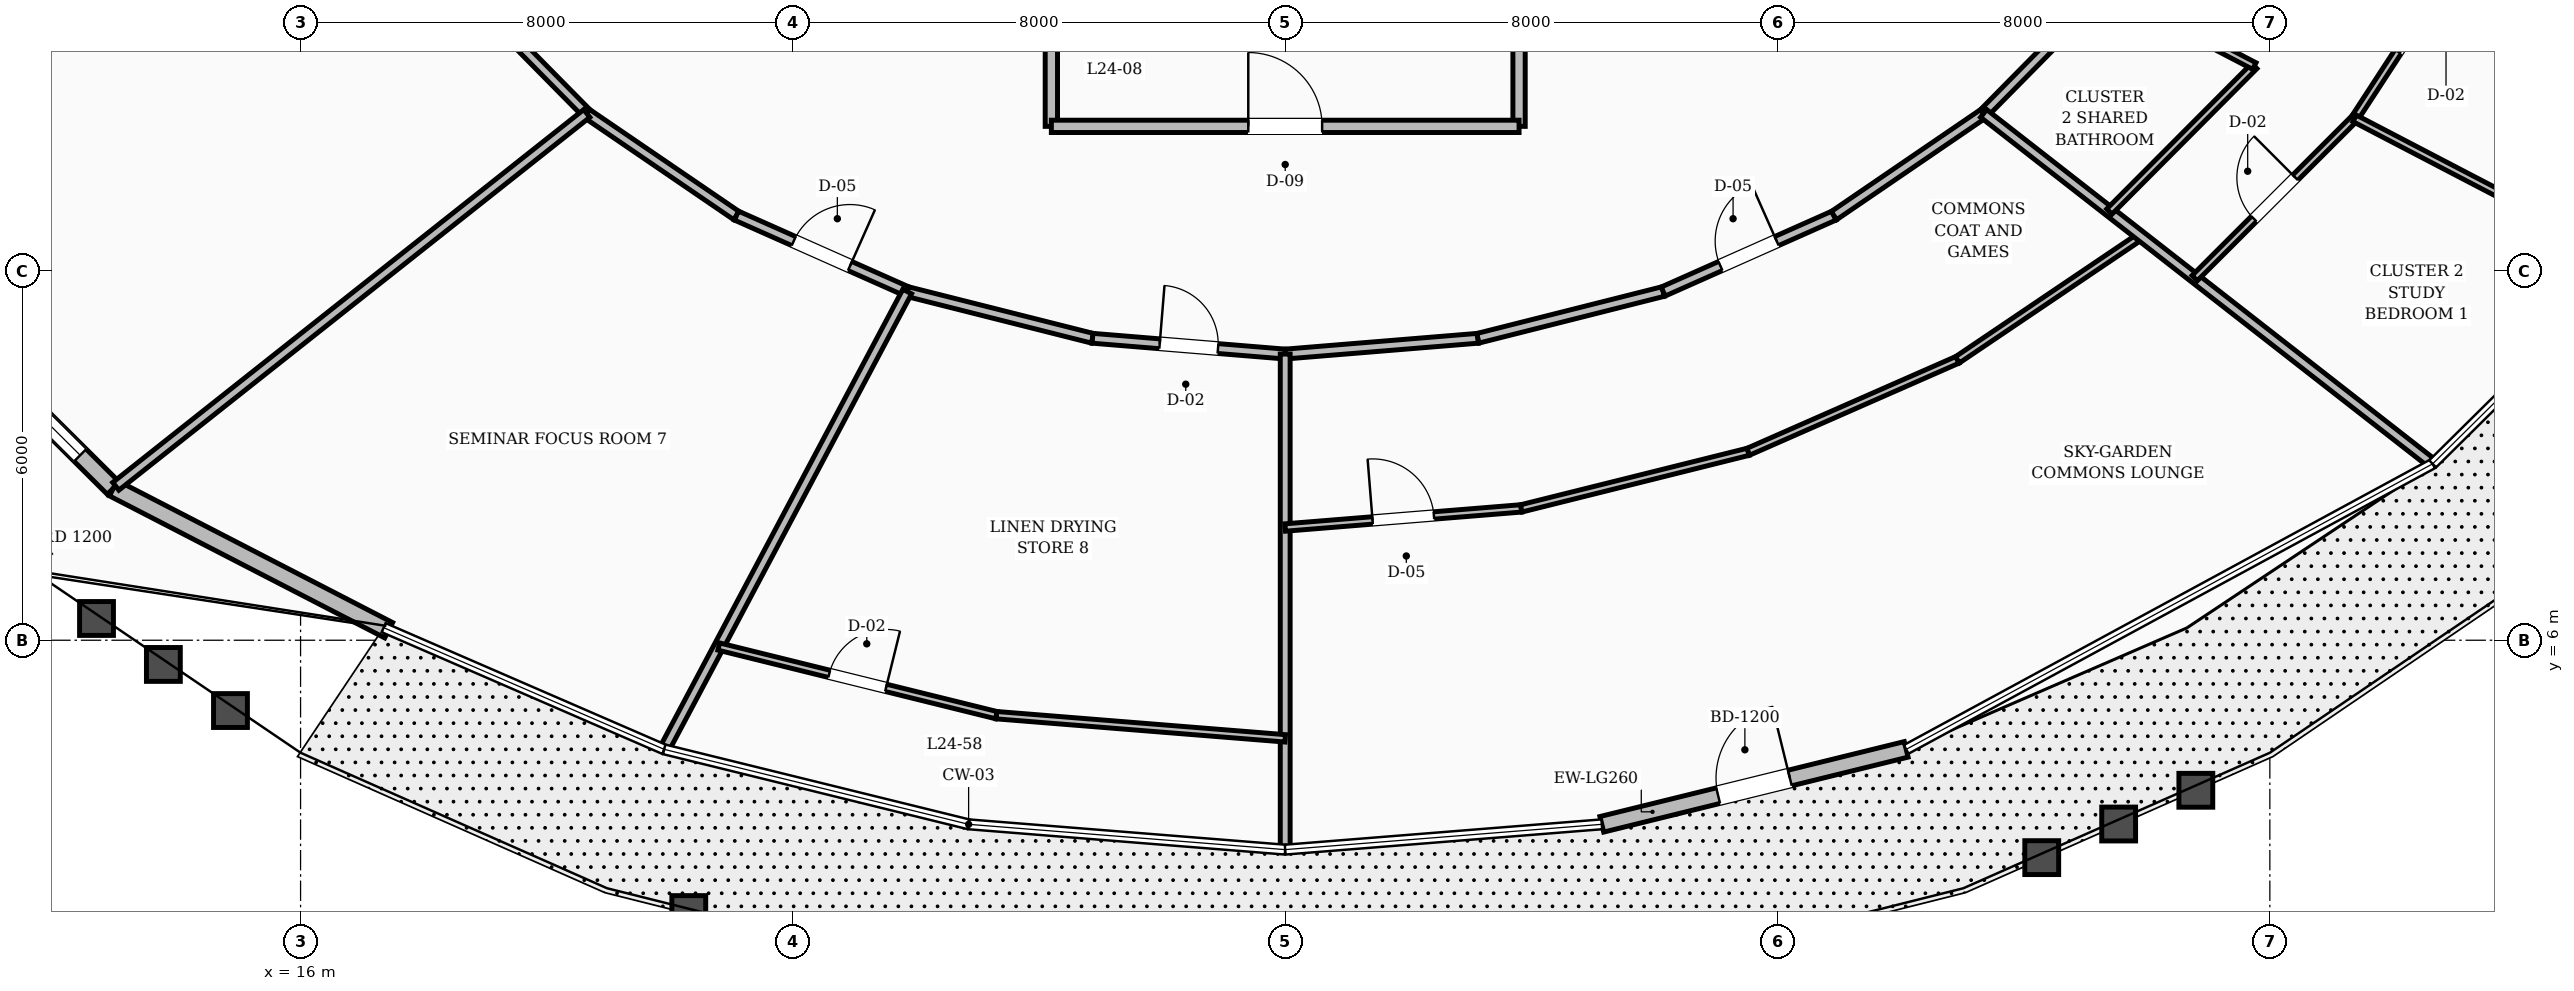
"""IFC4 building model, lengths in metres.
Left out: names, types, materials, properties, quantities, classifications, styles, units other than length and angle.
Written with IfcOpenShell. Run it as: python <this file> out.ifc"""

import sys

from ifc_helpers import new_model, si_unit, direction, frame, frame_2d, origin, place, context, subcontext, project, spatial, rectangle, extrude, element, fill, save


model = new_model("IFC4")
c1 = context("Model", 3, precision=1e-05, world=origin(), true_north=direction((0.0, 1.0)))
c2 = subcontext(c1, "Body", "Model", "MODEL_VIEW")
j1 = project(units=[si_unit("LENGTHUNIT", "METRE"), si_unit("PLANEANGLEUNIT", "RADIAN")], contexts=[c1])
p1 = place(None, origin())
s1 = spatial("IfcSite", under=j1, at=p1, CompositionType="ELEMENT")
p2 = place(p1, origin())
s2 = spatial("IfcBuilding", under=s1, at=p2, CompositionType="ELEMENT")
p3 = place(p2, frame((0.0, 0.0, 95.2)))
s3 = spatial("IfcBuildingStorey", under=s2, at=p3, CompositionType="ELEMENT", Elevation=95.2)
p4 = place(p3, frame((9.609, 11.798, 0.0), z_axis=(0.0, 0.0, 1.0), x_axis=(0.70930102543, -0.70490570669, 0.0)))
e1 = element("IfcWall", 1, at=p4, inside=s3, PredefinedType="STANDARD", context=c2, shape_type="SweptSolid", body=[
    extrude(rectangle(XDim=4.721, YDim=0.28, at=frame_2d((2.361, 0.0))), origin(), (0.0, 0.0, 1.0), 2.71),
])
p5 = place(p4, frame((0.761, 0.0, 0.8)))
e2 = element("IfcOpeningElement", 2, at=p5, cuts=e1, PredefinedType="OPENING", context=c2, shape_type="SweptSolid", body=[
    extrude(rectangle(XDim=3.2, YDim=1.65, at=frame_2d((1.6, 0.825))), frame((0.0, 0.15, 0.0), z_axis=(0.0, -1.0, 0.0), x_axis=(1.0, 0.0, 0.0)), (0.0, 0.0, 1.0), 0.3),
])
p6 = place(p3, frame((12.958, 8.47, 0.0), z_axis=(0.0, 0.0, 1.0), x_axis=(0.888710545959, -0.458468718127, 0.0)))
e3 = element("IfcWall", 3, at=p6, inside=s3, PredefinedType="STANDARD", context=c2, shape_type="SweptSolid", body=[
    extrude(rectangle(XDim=5.034, YDim=0.28, at=frame_2d((2.517, 0.0))), origin(), (0.0, 0.0, 1.0), 2.71),
])
p7 = place(p3, frame((37.144, 3.009, 0.0), z_axis=(0.0, 0.0, 1.0), x_axis=(0.970998963329, 0.239083694998, 0.0)))
e4 = element("IfcWall", 4, at=p7, inside=s3, PredefinedType="STANDARD", context=c2, shape_type="SweptSolid", body=[
    extrude(rectangle(XDim=5.094, YDim=0.26, at=frame_2d((2.547, 0.0))), origin(), (0.0, 0.0, 1.0), 2.71),
])
p8 = place(p7, frame((1.947, 0.0, 0.0)))
e5 = element("IfcOpeningElement", 5, at=p8, cuts=e4, PredefinedType="OPENING", context=c2, shape_type="SweptSolid", body=[
    extrude(rectangle(XDim=1.2, YDim=2.15, at=frame_2d((0.6, 1.075))), frame((0.0, 0.14, 0.0), z_axis=(0.0, -1.0, 0.0), x_axis=(1.0, 0.0, 0.0)), (0.0, 0.0, 1.0), 0.28),
])
for number, where, z_axis, x_axis in (
    (6, (28.2, 14.35, 0.0), (0.0, 0.0, 1.0), (0.0, 1.0, 0.0)),
    (7, (35.8, 14.35, 0.0), (0.0, 0.0, 1.0), (0.0, 1.0, 0.0)),
):
    element("IfcWall", number, at=place(p3, frame(where, z_axis=z_axis, x_axis=x_axis)), inside=s3, PredefinedType="SOLIDWALL", context=c2, shape_type="SweptSolid", body=[
        extrude(rectangle(XDim=2.2, YDim=0.2, at=frame_2d((1.1, 0.0))), origin(), (0.0, 0.0, 1.0), 2.71),
    ])
p9 = place(p3, frame((28.2, 14.35, 0.0), z_axis=(0.0, 0.0, 1.0), x_axis=(1.0, 0.0, 0.0)))
e8 = element("IfcWall", 8, at=p9, inside=s3, PredefinedType="SOLIDWALL", context=c2, shape_type="SweptSolid", body=[
    extrude(rectangle(XDim=7.6, YDim=0.2, at=frame_2d((3.8, 0.0))), origin(), (0.0, 0.0, 1.0), 2.71),
])
p10 = place(p9, frame((3.2, 0.0, 0.0)))
e9 = element("IfcOpeningElement", 9, at=p10, cuts=e8, PredefinedType="OPENING", context=c2, shape_type="SweptSolid", body=[
    extrude(rectangle(XDim=1.2, YDim=2.1, at=frame_2d((0.6, 1.05))), frame((0.0, 0.11, 0.0), z_axis=(0.0, -1.0, 0.0), x_axis=(1.0, 0.0, 0.0)), (0.0, 0.0, 1.0), 0.22),
])
p11 = place(p3, frame((18.655, 16.583, 0.0), z_axis=(0.0, 0.0, 1.0), x_axis=(0.702366174226, -0.711815816981, 0.0)))
e10 = element("IfcWall", 10, at=p11, inside=s3, PredefinedType="SOLIDWALL", context=c2, shape_type="SweptSolid", body=[
    extrude(rectangle(XDim=2.842, YDim=0.16, at=frame_2d((1.421, 0.0))), origin(), (0.0, 0.0, 1.0), 2.71),
])
p12 = place(p3, frame((20.651, 14.56, 0.0), z_axis=(0.0, 0.0, 1.0), x_axis=(0.825929039072, -0.563774088104, 0.0)))
e11 = element("IfcWall", 11, at=p12, inside=s3, PredefinedType="SOLIDWALL", context=c2, shape_type="SweptSolid", body=[
    extrude(rectangle(XDim=2.945, YDim=0.16, at=frame_2d((1.472, 0.0))), origin(), (0.0, 0.0, 1.0), 2.71),
])
p13 = place(p3, frame((23.083, 12.9, 0.0), z_axis=(0.0, 0.0, 1.0), x_axis=(0.913768445178, -0.406235434936, 0.0)))
e12 = element("IfcWall", 12, at=p13, inside=s3, PredefinedType="SOLIDWALL", context=c2, shape_type="SweptSolid", body=[
    extrude(rectangle(XDim=3.037, YDim=0.16, at=frame_2d((1.519, 0.0))), origin(), (0.0, 0.0, 1.0), 2.71),
])
p14 = place(p13, frame((1.018, 0.0, 0.0)))
e13 = element("IfcOpeningElement", 13, at=p14, cuts=e12, PredefinedType="OPENING", context=c2, shape_type="SweptSolid", body=[
    extrude(rectangle(XDim=1.0, YDim=2.1, at=frame_2d((0.5, 1.05))), frame((0.0, 0.09, 0.0), z_axis=(0.0, -1.0, 0.0), x_axis=(1.0, 0.0, 0.0)), (0.0, 0.0, 1.0), 0.18),
])
p15 = place(p3, frame((25.858, 11.666, 0.0), z_axis=(0.0, 0.0, 1.0), x_axis=(0.969608333194, -0.244662380029, 0.0)))
e14 = element("IfcWall", 14, at=p15, inside=s3, PredefinedType="SOLIDWALL", context=c2, shape_type="SweptSolid", body=[
    extrude(rectangle(XDim=3.105, YDim=0.16, at=frame_2d((1.553, 0.0))), origin(), (0.0, 0.0, 1.0), 2.71),
])
p16 = place(p3, frame((28.869, 10.906, 0.0), z_axis=(0.0, 0.0, 1.0), x_axis=(0.996658973252, -0.081675522876, 0.0)))
e15 = element("IfcWall", 15, at=p16, inside=s3, PredefinedType="SOLIDWALL", context=c2, shape_type="SweptSolid", body=[
    extrude(rectangle(XDim=3.142, YDim=0.16, at=frame_2d((1.571, 0.0))), origin(), (0.0, 0.0, 1.0), 2.71),
])
p17 = place(p16, frame((1.096, 0.0, 0.0)))
e16 = element("IfcOpeningElement", 16, at=p17, cuts=e15, PredefinedType="OPENING", context=c2, shape_type="SweptSolid", body=[
    extrude(rectangle(XDim=0.95, YDim=2.1, at=frame_2d((0.475, 1.05))), frame((0.0, 0.09, 0.0), z_axis=(0.0, -1.0, 0.0), x_axis=(1.0, 0.0, 0.0)), (0.0, 0.0, 1.0), 0.18),
])
p18 = place(p3, frame((32.0, 10.65, 0.0), z_axis=(0.0, 0.0, 1.0), x_axis=(0.996658973252, 0.081675522876, 0.0)))
e17 = element("IfcWall", 17, at=p18, inside=s3, PredefinedType="SOLIDWALL", context=c2, shape_type="SweptSolid", body=[
    extrude(rectangle(XDim=3.142, YDim=0.16, at=frame_2d((1.571, 0.0))), origin(), (0.0, 0.0, 1.0), 2.71),
])
p19 = place(p3, frame((35.131, 10.906, 0.0), z_axis=(0.0, 0.0, 1.0), x_axis=(0.969608333194, 0.244662380029, 0.0)))
e18 = element("IfcWall", 18, at=p19, inside=s3, PredefinedType="SOLIDWALL", context=c2, shape_type="SweptSolid", body=[
    extrude(rectangle(XDim=3.105, YDim=0.16, at=frame_2d((1.553, 0.0))), origin(), (0.0, 0.0, 1.0), 2.71),
])
p20 = place(p3, frame((38.142, 11.666, 0.0), z_axis=(0.0, 0.0, 1.0), x_axis=(0.913768445178, 0.406235434936, 0.0)))
e19 = element("IfcWall", 19, at=p20, inside=s3, PredefinedType="SOLIDWALL", context=c2, shape_type="SweptSolid", body=[
    extrude(rectangle(XDim=3.037, YDim=0.16, at=frame_2d((1.519, 0.0))), origin(), (0.0, 0.0, 1.0), 2.71),
])
p21 = place(p20, frame((1.018, 0.0, 0.0)))
e20 = element("IfcOpeningElement", 20, at=p21, cuts=e19, PredefinedType="OPENING", context=c2, shape_type="SweptSolid", body=[
    extrude(rectangle(XDim=1.0, YDim=2.1, at=frame_2d((0.5, 1.05))), frame((0.0, 0.09, 0.0), z_axis=(0.0, -1.0, 0.0), x_axis=(1.0, 0.0, 0.0)), (0.0, 0.0, 1.0), 0.18),
])
p22 = place(p3, frame((40.917, 12.9, 0.0), z_axis=(0.0, 0.0, 1.0), x_axis=(0.825929039072, 0.563774088104, 0.0)))
e21 = element("IfcWall", 21, at=p22, inside=s3, PredefinedType="SOLIDWALL", context=c2, shape_type="SweptSolid", body=[
    extrude(rectangle(XDim=2.945, YDim=0.16, at=frame_2d((1.472, 0.0))), origin(), (0.0, 0.0, 1.0), 2.71),
])
p23 = place(p3, frame((43.349, 14.56, 0.0), z_axis=(0.0, 0.0, 1.0), x_axis=(0.702366174226, 0.711815816981, 0.0)))
e22 = element("IfcWall", 22, at=p23, inside=s3, PredefinedType="SOLIDWALL", context=c2, shape_type="SweptSolid", body=[
    extrude(rectangle(XDim=2.842, YDim=0.16, at=frame_2d((1.421, 0.0))), origin(), (0.0, 0.0, 1.0), 2.71),
])
p24 = place(p3, frame((32.0, 10.65, 0.0), z_axis=(0.0, 0.0, 1.0), x_axis=(0.0, -1.0, 0.0)))
e23 = element("IfcWall", 23, at=p24, inside=s3, PredefinedType="SOLIDWALL", context=c2, shape_type="SweptSolid", body=[
    extrude(rectangle(XDim=8.002, YDim=0.16, at=frame_2d((4.001, 0.0))), origin(), (0.0, 0.0, 1.0), 2.71),
])
p25 = place(p3, frame((32.0, 7.832, 0.0), z_axis=(0.0, 0.0, 1.0), x_axis=(0.996738571309, 0.080698330005, 0.0)))
e24 = element("IfcWall", 24, at=p25, inside=s3, PredefinedType="PARTITIONING", context=c2, shape_type="SweptSolid", body=[
    extrude(rectangle(XDim=3.848, YDim=0.12, at=frame_2d((1.924, 0.0))), origin(), (0.0, 0.0, 1.0), 2.71),
])
p26 = place(p25, frame((1.424, 0.0, 0.0)))
e25 = element("IfcOpeningElement", 25, at=p26, cuts=e24, PredefinedType="OPENING", context=c2, shape_type="SweptSolid", body=[
    extrude(rectangle(XDim=1.0, YDim=2.1, at=frame_2d((0.5, 1.05))), frame((0.0, 0.07, 0.0), z_axis=(0.0, -1.0, 0.0), x_axis=(1.0, 0.0, 0.0)), (0.0, 0.0, 1.0), 0.14),
])
p27 = place(p3, frame((35.836, 8.142, 0.0), z_axis=(0.0, 0.0, 1.0), x_axis=(0.970263267769, 0.242052042376, 0.0)))
e26 = element("IfcWall", 26, at=p27, inside=s3, PredefinedType="PARTITIONING", context=c2, shape_type="SweptSolid", body=[
    extrude(rectangle(XDim=3.802, YDim=0.12, at=frame_2d((1.901, 0.0))), origin(), (0.0, 0.0, 1.0), 2.71),
])
p28 = place(p3, frame((39.524, 9.062, 0.0), z_axis=(0.0, 0.0, 1.0), x_axis=(0.915498172981, 0.402322128733, 0.0)))
e27 = element("IfcWall", 27, at=p28, inside=s3, PredefinedType="PARTITIONING", context=c2, shape_type="SweptSolid", body=[
    extrude(rectangle(XDim=3.713, YDim=0.12, at=frame_2d((1.856, 0.0))), origin(), (0.0, 0.0, 1.0), 2.71),
])
p29 = place(p3, frame((42.924, 10.556, 0.0), z_axis=(0.0, 0.0, 1.0), x_axis=(0.828880957911, 0.559425024121, 0.0)))
e28 = element("IfcWall", 28, at=p29, inside=s3, PredefinedType="PARTITIONING", context=c2, shape_type="SweptSolid", body=[
    extrude(rectangle(XDim=3.594, YDim=0.12, at=frame_2d((1.797, 0.0))), origin(), (0.0, 0.0, 1.0), 2.71),
])
p30 = place(p3, frame((43.349, 14.56, 0.0), z_axis=(0.0, 0.0, 1.0), x_axis=(0.788377274066, -0.615192062478, 0.0)))
e29 = element("IfcWall", 29, at=p30, inside=s3, PredefinedType="SOLIDWALL", context=c2, shape_type="SweptSolid", body=[
    extrude(rectangle(XDim=9.205, YDim=0.16, at=frame_2d((4.603, 0.0))), origin(), (0.0, 0.0, 1.0), 2.71),
])
p31 = place(p3, frame((45.392, 12.966, 0.0), z_axis=(0.0, 0.0, 1.0), x_axis=(0.705715635455, 0.708495195379, 0.0)))
e30 = element("IfcWall", 30, at=p31, inside=s3, PredefinedType="PARTITIONING", context=c2, shape_type="SweptSolid", body=[
    extrude(rectangle(XDim=3.338, YDim=0.12, at=frame_2d((1.669, 0.0))), origin(), (0.0, 0.0, 1.0), 2.71),
])
p32 = place(p3, frame((45.345, 16.583, 0.0), z_axis=(0.0, 0.0, 1.0), x_axis=(0.886729414964, -0.46228881085, 0.0)))
e31 = element("IfcWall", 31, at=p32, inside=s3, PredefinedType="PARTITIONING", context=c2, shape_type="SweptSolid", body=[
    extrude(rectangle(XDim=2.709, YDim=0.12, at=frame_2d((1.354, 0.0))), origin(), (0.0, 0.0, 1.0), 2.71),
])
p33 = place(p32, frame((0.44, 0.0, 0.0)))
e32 = element("IfcOpeningElement", 32, at=p33, cuts=e31, PredefinedType="OPENING", context=c2, shape_type="SweptSolid", body=[
    extrude(rectangle(XDim=0.86, YDim=2.1, at=frame_2d((0.43, 1.05))), frame((0.0, 0.07, 0.0), z_axis=(0.0, -1.0, 0.0), x_axis=(1.0, 0.0, 0.0)), (0.0, 0.0, 1.0), 0.14),
])
p34 = place(p3, frame((46.779, 11.884, 0.0), z_axis=(0.0, 0.0, 1.0), x_axis=(0.707472185224, 0.706741188226, 0.0)))
e33 = element("IfcWall", 33, at=p34, inside=s3, PredefinedType="PARTITIONING", context=c2, shape_type="SweptSolid", body=[
    extrude(rectangle(XDim=3.674, YDim=0.12, at=frame_2d((1.837, 0.0))), origin(), (0.0, 0.0, 1.0), 2.71),
])
p35 = place(p34, frame((1.362, 0.0, 0.0)))
e34 = element("IfcOpeningElement", 34, at=p35, cuts=e33, PredefinedType="OPENING", context=c2, shape_type="SweptSolid", body=[
    extrude(rectangle(XDim=0.95, YDim=2.1, at=frame_2d((0.475, 1.05))), frame((0.0, 0.07, 0.0), z_axis=(0.0, -1.0, 0.0), x_axis=(1.0, 0.0, 0.0)), (0.0, 0.0, 1.0), 0.14),
])
p36 = place(p3, frame((49.378, 14.48, 0.0), z_axis=(0.0, 0.0, 1.0), x_axis=(0.546147739328, 0.837688872331, 0.0)))
e35 = element("IfcWall", 35, at=p36, inside=s3, PredefinedType="PARTITIONING", context=c2, shape_type="SweptSolid", body=[
    extrude(rectangle(XDim=3.536, YDim=0.12, at=frame_2d((1.768, 0.0))), origin(), (0.0, 0.0, 1.0), 2.71),
])
p37 = place(p36, frame((1.293, 0.0, 0.0)))
e36 = element("IfcOpeningElement", 36, at=p37, cuts=e35, PredefinedType="OPENING", context=c2, shape_type="SweptSolid", body=[
    extrude(rectangle(XDim=0.95, YDim=2.1, at=frame_2d((0.475, 1.05))), frame((0.0, 0.07, 0.0), z_axis=(0.0, -1.0, 0.0), x_axis=(1.0, 0.0, 0.0)), (0.0, 0.0, 1.0), 0.14),
])
p38 = place(p3, frame((49.378, 14.48, 0.0), z_axis=(0.0, 0.0, 1.0), x_axis=(0.886712531702, -0.462321193677, 0.0)))
e37 = element("IfcWall", 37, at=p38, inside=s3, PredefinedType="PARTITIONING", context=c2, shape_type="SweptSolid", body=[
    extrude(rectangle(XDim=5.079, YDim=0.12, at=frame_2d((2.539, 0.0))), origin(), (0.0, 0.0, 1.0), 2.71),
])
p39 = place(p3, frame((20.651, 14.56, 0.0), z_axis=(0.0, 0.0, 1.0), x_axis=(-0.784047853106, -0.620700381859, 0.0)))
e38 = element("IfcWall", 38, at=p39, inside=s3, PredefinedType="SOLIDWALL", context=c2, shape_type="SweptSolid", body=[
    extrude(rectangle(XDim=9.761, YDim=0.16, at=frame_2d((4.881, 0.0))), origin(), (0.0, 0.0, 1.0), 2.71),
])
p40 = place(p3, frame((25.858, 11.666, 0.0), z_axis=(0.0, 0.0, 1.0), x_axis=(-0.468857429223, -0.883273859605, 0.0)))
e39 = element("IfcWall", 39, at=p40, inside=s3, PredefinedType="SOLIDWALL", context=c2, shape_type="SweptSolid", body=[
    extrude(rectangle(XDim=8.373, YDim=0.16, at=frame_2d((4.186, 0.0))), origin(), (0.0, 0.0, 1.0), 2.71),
])
p41 = place(p3, frame((22.796, 5.897, 0.0), z_axis=(0.0, 0.0, 1.0), x_axis=(0.970794067923, -0.239914313215, 0.0)))
e40 = element("IfcWall", 40, at=p41, inside=s3, PredefinedType="PARTITIONING", context=c2, shape_type="SweptSolid", body=[
    extrude(rectangle(XDim=4.647, YDim=0.12, at=frame_2d((2.324, 0.0))), origin(), (0.0, 0.0, 1.0), 2.71),
])
p42 = place(p41, frame((1.849, 0.0, 0.0)))
e41 = element("IfcOpeningElement", 41, at=p42, cuts=e40, PredefinedType="OPENING", context=c2, shape_type="SweptSolid", body=[
    extrude(rectangle(XDim=0.95, YDim=2.1, at=frame_2d((0.475, 1.05))), frame((0.0, 0.07, 0.0), z_axis=(0.0, -1.0, 0.0), x_axis=(1.0, 0.0, 0.0)), (0.0, 0.0, 1.0), 0.14),
])
p43 = place(p3, frame((27.308, 4.782, 0.0), z_axis=(0.0, 0.0, 1.0), x_axis=(0.996797113243, -0.079971964028, 0.0)))
e42 = element("IfcWall", 42, at=p43, inside=s3, PredefinedType="PARTITIONING", context=c2, shape_type="SweptSolid", body=[
    extrude(rectangle(XDim=4.708, YDim=0.12, at=frame_2d((2.354, 0.0))), origin(), (0.0, 0.0, 1.0), 2.71),
])
p44 = place(p5, origin())
e43 = element("IfcWindow", 43, at=p44, inside=s3, PartitioningType="SINGLE_PANEL", PredefinedType="WINDOW", context=c2, shape_type="SweptSolid", body=[
    extrude(rectangle(XDim=3.2, YDim=1.65, at=frame_2d((1.6, 0.825))), frame((0.0, 0.03, 0.0), z_axis=(0.0, -1.0, 0.0), x_axis=(1.0, 0.0, 0.0)), (0.0, 0.0, 1.0), 0.06),
])
fill(e2, e43)
p45 = place(p8, origin())
e44 = element("IfcDoor", 44, at=p45, inside=s3, OperationType="SINGLE_SWING_RIGHT", PredefinedType="DOOR", context=c2, shape_type="SweptSolid", body=[
    extrude(rectangle(XDim=1.2, YDim=2.15, at=frame_2d((0.6, 1.075))), frame((0.0, 0.025, 0.0), z_axis=(0.0, -1.0, 0.0), x_axis=(1.0, 0.0, 0.0)), (0.0, 0.0, 1.0), 0.05),
])
fill(e5, e44)
p46 = place(p10, origin())
e45 = element("IfcDoor", 45, at=p46, inside=s3, OperationType="SINGLE_SWING_LEFT", PredefinedType="DOOR", context=c2, shape_type="SweptSolid", body=[
    extrude(rectangle(XDim=1.2, YDim=2.1, at=frame_2d((0.6, 1.05))), frame((0.0, 0.025, 0.0), z_axis=(0.0, -1.0, 0.0), x_axis=(1.0, 0.0, 0.0)), (0.0, 0.0, 1.0), 0.05),
])
fill(e9, e45)
p47 = place(p21, origin())
e46 = element("IfcDoor", 46, at=p47, inside=s3, OperationType="SINGLE_SWING_RIGHT", PredefinedType="DOOR", context=c2, shape_type="SweptSolid", body=[
    extrude(rectangle(XDim=1.0, YDim=2.1, at=frame_2d((0.5, 1.05))), frame((0.0, 0.025, 0.0), z_axis=(0.0, -1.0, 0.0), x_axis=(1.0, 0.0, 0.0)), (0.0, 0.0, 1.0), 0.05),
])
fill(e20, e46)
p48 = place(p26, origin())
e47 = element("IfcDoor", 47, at=p48, inside=s3, OperationType="SINGLE_SWING_LEFT", PredefinedType="DOOR", context=c2, shape_type="SweptSolid", body=[
    extrude(rectangle(XDim=1.0, YDim=2.1, at=frame_2d((0.5, 1.05))), frame((0.0, 0.025, 0.0), z_axis=(0.0, -1.0, 0.0), x_axis=(1.0, 0.0, 0.0)), (0.0, 0.0, 1.0), 0.05),
])
fill(e25, e47)
p49 = place(p35, origin())
e48 = element("IfcDoor", 48, at=p49, inside=s3, OperationType="SINGLE_SWING_RIGHT", PredefinedType="DOOR", context=c2, shape_type="SweptSolid", body=[
    extrude(rectangle(XDim=0.95, YDim=2.1, at=frame_2d((0.475, 1.05))), frame((0.0, 0.025, 0.0), z_axis=(0.0, -1.0, 0.0), x_axis=(1.0, 0.0, 0.0)), (0.0, 0.0, 1.0), 0.05),
])
fill(e34, e48)
p50 = place(p37, origin())
e49 = element("IfcDoor", 49, at=p50, inside=s3, OperationType="SINGLE_SWING_LEFT", PredefinedType="DOOR", context=c2, shape_type="SweptSolid", body=[
    extrude(rectangle(XDim=0.95, YDim=2.1, at=frame_2d((0.475, 1.05))), frame((0.0, 0.025, 0.0), z_axis=(0.0, -1.0, 0.0), x_axis=(1.0, 0.0, 0.0)), (0.0, 0.0, 1.0), 0.05),
])
fill(e36, e49)
p51 = place(p14, origin())
e50 = element("IfcDoor", 50, at=p51, inside=s3, OperationType="SINGLE_SWING_RIGHT", PredefinedType="DOOR", context=c2, shape_type="SweptSolid", body=[
    extrude(rectangle(XDim=1.0, YDim=2.1, at=frame_2d((0.5, 1.05))), frame((0.0, 0.025, 0.0), z_axis=(0.0, -1.0, 0.0), x_axis=(1.0, 0.0, 0.0)), (0.0, 0.0, 1.0), 0.05),
])
fill(e13, e50)
p52 = place(p17, origin())
e51 = element("IfcDoor", 51, at=p52, inside=s3, OperationType="SINGLE_SWING_LEFT", PredefinedType="DOOR", context=c2, shape_type="SweptSolid", body=[
    extrude(rectangle(XDim=0.95, YDim=2.1, at=frame_2d((0.475, 1.05))), frame((0.0, 0.025, 0.0), z_axis=(0.0, -1.0, 0.0), x_axis=(1.0, 0.0, 0.0)), (0.0, 0.0, 1.0), 0.05),
])
fill(e16, e51)
p53 = place(p42, origin())
e52 = element("IfcDoor", 52, at=p53, inside=s3, OperationType="SINGLE_SWING_RIGHT", PredefinedType="DOOR", context=c2, shape_type="SweptSolid", body=[
    extrude(rectangle(XDim=0.95, YDim=2.1, at=frame_2d((0.475, 1.05))), frame((0.0, 0.025, 0.0), z_axis=(0.0, -1.0, 0.0), x_axis=(1.0, 0.0, 0.0)), (0.0, 0.0, 1.0), 0.05),
])
fill(e41, e52)
save(model, sys.argv[1])
